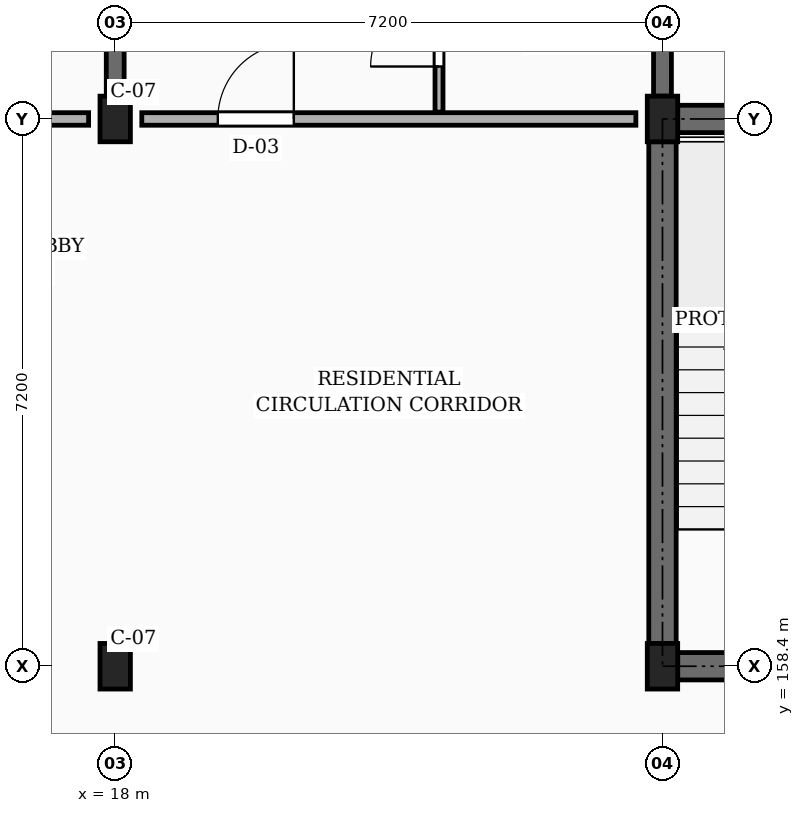
"""IFC4 building model, lengths in metres.
Left out: names, types, materials, properties, quantities, classifications, styles, units other than length and angle.
Written with IfcOpenShell. Run it as: python <this file> out.ifc"""

import sys

from ifc_helpers import new_model, si_unit, direction, frame, frame_2d, origin, origin_2d, place, context, subcontext, project, spatial, rectangle, extrude, element, fill, save


model = new_model("IFC4")
c1 = context("Model", 3, precision=1e-05, world=origin(), true_north=direction((0.0, 1.0)))
c2 = subcontext(c1, "Body", "Model", "MODEL_VIEW")
j1 = project(units=[si_unit("LENGTHUNIT", "METRE"), si_unit("PLANEANGLEUNIT", "RADIAN")], contexts=[c1])
p1 = place(None, origin())
s1 = spatial("IfcSite", under=j1, at=p1, CompositionType="ELEMENT")
p2 = place(p1, origin())
s2 = spatial("IfcBuilding", under=s1, at=p2, CompositionType="ELEMENT")
p3 = place(p2, frame((0.0, 0.0, 23.4)))
s3 = spatial("IfcBuildingStorey", under=s2, at=p3, CompositionType="ELEMENT", Elevation=23.4)
for number, where, z_axis, x_axis in (
    (1, (18.0, 158.4, 0.0), (0.0, 0.0, 1.0), (1.0, 0.0, 0.0)),
    (2, (18.0, 165.6, 0.0), (0.0, 0.0, 1.0), (1.0, 0.0, 0.0)),
    (3, (25.2, 158.4, 0.0), (0.0, 0.0, 1.0), (1.0, 0.0, 0.0)),
    (4, (25.2, 165.6, 0.0), (0.0, 0.0, 1.0), (1.0, 0.0, 0.0)),
):
    element("IfcColumn", number, at=place(p3, frame(where, z_axis=z_axis, x_axis=x_axis)), inside=s3, PredefinedType="COLUMN", context=c2, shape_type="SweptSolid", body=[
        extrude(rectangle(XDim=0.4, YDim=0.6, at=origin_2d()), origin(), (0.0, 0.0, 1.0), 3.15),
    ])
p4 = place(p3, frame((18.0, 165.9, 0.0), z_axis=(0.0, 0.0, 1.0), x_axis=(0.0, 1.0, 0.0)))
e5 = element("IfcWall", 5, at=p4, inside=s3, PredefinedType="SOLIDWALL", context=c2, shape_type="SweptSolid", body=[
    extrude(rectangle(XDim=6.65, YDim=0.235, at=frame_2d((3.325, 0.0))), origin(), (0.0, 0.0, 1.0), 2.185),
])
p5 = place(p3, frame((25.2, 165.9, 0.0), z_axis=(0.0, 0.0, 1.0), x_axis=(0.0, 1.0, 0.0)))
e6 = element("IfcWall", 6, at=p5, inside=s3, PredefinedType="SOLIDWALL", context=c2, shape_type="SweptSolid", body=[
    extrude(rectangle(XDim=6.65, YDim=0.235, at=frame_2d((3.325, 0.0))), origin(), (0.0, 0.0, 1.0), 2.185),
])
p6 = place(p5, frame((4.15, 0.0, 0.0)))
e7 = element("IfcOpeningElement", 7, at=p6, cuts=e6, PredefinedType="OPENING", context=c2, shape_type="SweptSolid", body=[
    extrude(rectangle(XDim=0.98, YDim=2.12, at=frame_2d((0.49, 1.06))), frame((0.0, 0.127, 0.0), z_axis=(0.0, -1.0, 0.0), x_axis=(1.0, 0.0, 0.0)), (0.0, 0.0, 1.0), 0.255),
])
p7 = place(p3, frame((25.2, 158.7, 0.0), z_axis=(0.0, 0.0, 1.0), x_axis=(0.0, 1.0, 0.0)))
e8 = element("IfcWall", 8, at=p7, inside=s3, PredefinedType="SHEAR", context=c2, shape_type="SweptSolid", body=[
    extrude(rectangle(XDim=6.6, YDim=0.36, at=frame_2d((3.3, 0.0))), origin(), (0.0, 0.0, 1.0), 2.885),
])
p8 = place(p3, frame((25.4, 165.6, 0.0), z_axis=(0.0, 0.0, 1.0), x_axis=(1.0, 0.0, 0.0)))
e9 = element("IfcWall", 9, at=p8, inside=s3, PredefinedType="SHEAR", context=c2, shape_type="SweptSolid", body=[
    extrude(rectangle(XDim=6.8, YDim=0.36, at=frame_2d((3.4, 0.0))), origin(), (0.0, 0.0, 1.0), 2.885),
])
p9 = place(p3, frame((25.4, 158.4, 0.0), z_axis=(0.0, 0.0, 1.0), x_axis=(1.0, 0.0, 0.0)))
e10 = element("IfcWall", 10, at=p9, inside=s3, PredefinedType="SHEAR", context=c2, shape_type="SweptSolid", body=[
    extrude(rectangle(XDim=6.8, YDim=0.36, at=frame_2d((3.4, 0.0))), origin(), (0.0, 0.0, 1.0), 2.885),
])
p10 = place(p9, frame((4.55, 0.0, 0.0)))
e11 = element("IfcOpeningElement", 11, at=p10, cuts=e10, PredefinedType="OPENING", context=c2, shape_type="SweptSolid", body=[
    extrude(rectangle(XDim=1.1, YDim=2.15, at=frame_2d((0.55, 1.075))), frame((0.0, 0.19, 0.0), z_axis=(0.0, -1.0, 0.0), x_axis=(1.0, 0.0, 0.0)), (0.0, 0.0, 1.0), 0.38),
])
p11 = place(p3, frame((11.15, 165.6, 0.0), z_axis=(0.0, 0.0, 1.0), x_axis=(1.0, 0.0, 0.0)))
e12 = element("IfcWall", 12, at=p11, inside=s3, PredefinedType="PARTITIONING", context=c2, shape_type="SweptSolid", body=[
    extrude(rectangle(XDim=6.5, YDim=0.165, at=frame_2d((3.25, 0.0))), origin(), (0.0, 0.0, 1.0), 2.32),
])
p12 = place(p11, frame((1.0, 0.0, 0.0)))
e13 = element("IfcOpeningElement", 13, at=p12, cuts=e12, PredefinedType="OPENING", context=c2, shape_type="SweptSolid", body=[
    extrude(rectangle(XDim=1.14, YDim=2.18, at=frame_2d((0.57, 1.09))), frame((0.0, 0.093, 0.0), z_axis=(0.0, -1.0, 0.0), x_axis=(1.0, 0.0, 0.0)), (0.0, 0.0, 1.0), 0.185),
])
p13 = place(p3, frame((18.35, 165.6, 0.0), z_axis=(0.0, 0.0, 1.0), x_axis=(1.0, 0.0, 0.0)))
e14 = element("IfcWall", 14, at=p13, inside=s3, PredefinedType="PARTITIONING", context=c2, shape_type="SweptSolid", body=[
    extrude(rectangle(XDim=6.5, YDim=0.165, at=frame_2d((3.25, 0.0))), origin(), (0.0, 0.0, 1.0), 2.32),
])
p14 = place(p13, frame((1.0, 0.0, 0.0)))
e15 = element("IfcOpeningElement", 15, at=p14, cuts=e14, PredefinedType="OPENING", context=c2, shape_type="SweptSolid", body=[
    extrude(rectangle(XDim=1.0, YDim=2.15, at=frame_2d((0.5, 1.075))), frame((0.0, 0.093, 0.0), z_axis=(0.0, -1.0, 0.0), x_axis=(1.0, 0.0, 0.0)), (0.0, 0.0, 1.0), 0.185),
])
p15 = place(p3, frame((22.26, 165.69, 0.0), z_axis=(0.0, 0.0, 1.0), x_axis=(0.0, 1.0, 0.0)))
e16 = element("IfcWall", 16, at=p15, inside=s3, PredefinedType="PARTITIONING", context=c2, shape_type="SweptSolid", body=[
    extrude(rectangle(XDim=2.1, YDim=0.105, at=frame_2d((1.05, 0.0))), origin(), (0.0, 0.0, 1.0), 2.32),
])
p16 = place(p15, frame((0.6, 0.0, 0.0)))
e17 = element("IfcOpeningElement", 17, at=p16, cuts=e16, PredefinedType="OPENING", context=c2, shape_type="SweptSolid", body=[
    extrude(rectangle(XDim=0.9, YDim=2.05, at=frame_2d((0.45, 1.025))), frame((0.0, 0.062, 0.0), z_axis=(0.0, -1.0, 0.0), x_axis=(1.0, 0.0, 0.0)), (0.0, 0.0, 1.0), 0.125),
])
p17 = place(p14, origin())
e18 = element("IfcDoor", 18, at=p17, inside=s3, OperationType="SINGLE_SWING_RIGHT", PredefinedType="DOOR", context=c2, shape_type="SweptSolid", body=[
    extrude(rectangle(XDim=1.0, YDim=2.15, at=frame_2d((0.5, 1.075))), frame((0.0, 0.025, 0.0), z_axis=(0.0, -1.0, 0.0), x_axis=(1.0, 0.0, 0.0)), (0.0, 0.0, 1.0), 0.05),
])
fill(e15, e18)
p18 = place(p16, origin())
e19 = element("IfcDoor", 19, at=p18, inside=s3, OperationType="SINGLE_SWING_LEFT", PredefinedType="DOOR", context=c2, shape_type="SweptSolid", body=[
    extrude(rectangle(XDim=0.9, YDim=2.05, at=frame_2d((0.45, 1.025))), frame((0.0, 0.025, 0.0), z_axis=(0.0, -1.0, 0.0), x_axis=(1.0, 0.0, 0.0)), (0.0, 0.0, 1.0), 0.05),
])
fill(e17, e19)
save(model, sys.argv[1])
